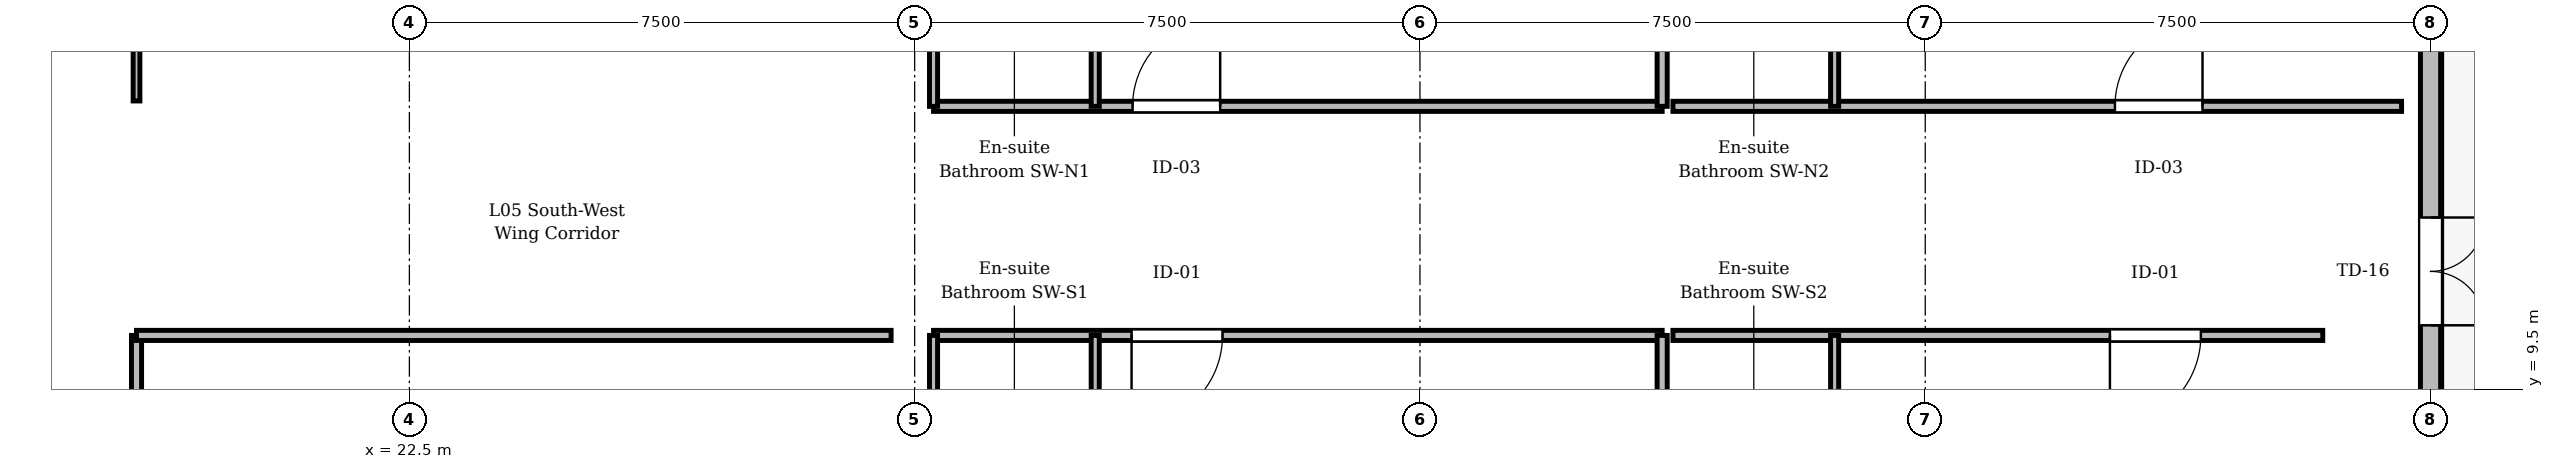
"""IFC4 building model, lengths in metres.
Left out: names, types, materials, properties, quantities, classifications, styles, units other than length and angle.
Written with IfcOpenShell. Run it as: python <this file> out.ifc"""

import sys

from ifc_helpers import new_model, si_unit, direction, frame, frame_2d, origin, place, context, subcontext, project, spatial, rectangle, extrude, element, fill, save


model = new_model("IFC4")
c1 = context("Model", 3, precision=1e-05, world=origin(), true_north=direction((0.0, 1.0)))
c2 = subcontext(c1, "Body", "Model", "MODEL_VIEW")
j1 = project(units=[si_unit("LENGTHUNIT", "METRE"), si_unit("PLANEANGLEUNIT", "RADIAN")], contexts=[c1])
p1 = place(None, origin())
s1 = spatial("IfcSite", under=j1, at=p1, CompositionType="ELEMENT")
p2 = place(p1, origin())
s2 = spatial("IfcBuilding", under=s1, at=p2, CompositionType="ELEMENT")
p3 = place(p2, frame((0.0, 0.0, 21.9)))
s3 = spatial("IfcBuildingStorey", under=s2, at=p3, CompositionType="ELEMENT", Elevation=21.9)
p4 = place(p3, frame((52.5, 14.765, 0.0), z_axis=(0.0, 0.0, 1.0), x_axis=(0.0, -1.0, 0.0)))
e1 = element("IfcWall", 1, at=p4, inside=s3, PredefinedType="STANDARD", context=c2, shape_type="SweptSolid", body=[
    extrude(rectangle(XDim=7.03, YDim=0.3, at=frame_2d((3.515, 0.0))), origin(), (0.0, 0.0, 1.0), 3.17),
])
p5 = place(p4, frame((2.715, 0.0, 0.0)))
e2 = element("IfcOpeningElement", 2, at=p5, cuts=e1, PredefinedType="OPENING", context=c2, shape_type="SweptSolid", body=[
    extrude(rectangle(XDim=1.6, YDim=2.35, at=frame_2d((0.8, 1.175))), frame((0.0, 0.16, 0.0), z_axis=(0.0, -1.0, 0.0), x_axis=(1.0, 0.0, 0.0)), (0.0, 0.0, 1.0), 0.32),
])
p6 = place(p3, frame((18.45, 10.3, 0.0), z_axis=(0.0, 0.0, 1.0), x_axis=(0.0, -1.0, 0.0)))
e3 = element("IfcWall", 3, at=p6, inside=s3, PredefinedType="PARTITIONING", context=c2, shape_type="SweptSolid", body=[
    extrude(rectangle(XDim=9.95, YDim=0.15, at=frame_2d((4.975, 0.0))), origin(), (0.0, 0.0, 1.0), 3.755),
])
p7 = place(p6, frame((5.92, 0.0, 0.0)))
e4 = element("IfcOpeningElement", 4, at=p7, cuts=e3, PredefinedType="OPENING", context=c2, shape_type="SweptSolid", body=[
    extrude(rectangle(XDim=1.35, YDim=2.25, at=frame_2d((0.675, 1.125))), frame((0.0, 0.085, 0.0), z_axis=(0.0, -1.0, 0.0), x_axis=(1.0, 0.0, 0.0)), (0.0, 0.0, 1.0), 0.17),
])
p8 = place(p3, frame((18.45, 23.114, 0.0), z_axis=(0.0, 0.0, 1.0), x_axis=(0.0, -1.0, 0.0)))
e5 = element("IfcWall", 5, at=p8, inside=s3, PredefinedType="PARTITIONING", context=c2, shape_type="SweptSolid", body=[
    extrude(rectangle(XDim=9.334, YDim=0.1, at=frame_2d((4.667, 0.0))), origin(), (0.0, 0.0, 1.0), 3.355),
])
p9 = place(p8, frame((4.092, 0.0, 0.0)))
e6 = element("IfcOpeningElement", 6, at=p9, cuts=e5, PredefinedType="OPENING", context=c2, shape_type="SweptSolid", body=[
    extrude(rectangle(XDim=1.15, YDim=2.2, at=frame_2d((0.575, 1.1))), frame((0.0, 0.06, 0.0), z_axis=(0.0, -1.0, 0.0), x_axis=(1.0, 0.0, 0.0)), (0.0, 0.0, 1.0), 0.12),
])
p10 = place(p3, frame((41.095, 10.3, 0.0), z_axis=(0.0, 0.0, 1.0), x_axis=(-1.0, 0.0, 0.0)))
e7 = element("IfcWall", 7, at=p10, inside=s3, PredefinedType="PARTITIONING", context=c2, shape_type="SweptSolid", body=[
    extrude(rectangle(XDim=10.815, YDim=0.15, at=frame_2d((5.407, 0.0))), origin(), (0.0, 0.0, 1.0), 3.755),
])
p11 = place(p10, frame((6.525, 0.0, 0.0)))
e8 = element("IfcOpeningElement", 8, at=p11, cuts=e7, PredefinedType="OPENING", context=c2, shape_type="SweptSolid", body=[
    extrude(rectangle(XDim=1.35, YDim=2.25, at=frame_2d((0.675, 1.125))), frame((0.0, 0.085, 0.0), z_axis=(0.0, -1.0, 0.0), x_axis=(1.0, 0.0, 0.0)), (0.0, 0.0, 1.0), 0.17),
])
p12 = place(p3, frame((32.68, 8.3, 0.0), z_axis=(0.0, 0.0, 1.0), x_axis=(0.0, 1.0, 0.0)))
e9 = element("IfcWall", 9, at=p12, inside=s3, PredefinedType="PARTITIONING", context=c2, shape_type="SweptSolid", body=[
    extrude(rectangle(XDim=2.0, YDim=0.12, at=frame_2d((1.0, 0.0))), origin(), (0.0, 0.0, 1.0), 3.755),
])
p13 = place(p3, frame((30.28, 13.7, 0.0), z_axis=(0.0, 0.0, 1.0), x_axis=(1.0, 0.0, 0.0)))
e10 = element("IfcWall", 10, at=p13, inside=s3, PredefinedType="PARTITIONING", context=c2, shape_type="SweptSolid", body=[
    extrude(rectangle(XDim=10.815, YDim=0.15, at=frame_2d((5.407, 0.0))), origin(), (0.0, 0.0, 1.0), 3.755),
])
p14 = place(p13, frame((2.955, 0.0, 0.0)))
e11 = element("IfcOpeningElement", 11, at=p14, cuts=e10, PredefinedType="OPENING", context=c2, shape_type="SweptSolid", body=[
    extrude(rectangle(XDim=1.3, YDim=2.2, at=frame_2d((0.65, 1.1))), frame((0.0, 0.085, 0.0), z_axis=(0.0, -1.0, 0.0), x_axis=(1.0, 0.0, 0.0)), (0.0, 0.0, 1.0), 0.17),
])
p15 = place(p3, frame((32.68, 13.7, 0.0), z_axis=(0.0, 0.0, 1.0), x_axis=(0.0, 1.0, 0.0)))
e12 = element("IfcWall", 12, at=p15, inside=s3, PredefinedType="PARTITIONING", context=c2, shape_type="SweptSolid", body=[
    extrude(rectangle(XDim=2.0, YDim=0.12, at=frame_2d((1.0, 0.0))), origin(), (0.0, 0.0, 1.0), 3.755),
])
p16 = place(p3, frame((50.9, 10.3, 0.0), z_axis=(0.0, 0.0, 1.0), x_axis=(-1.0, 0.0, 0.0)))
e13 = element("IfcWall", 13, at=p16, inside=s3, PredefinedType="PARTITIONING", context=c2, shape_type="SweptSolid", body=[
    extrude(rectangle(XDim=9.645, YDim=0.15, at=frame_2d((4.823, 0.0))), origin(), (0.0, 0.0, 1.0), 3.755),
])
p17 = place(p16, frame((1.809, 0.0, 0.0)))
e14 = element("IfcOpeningElement", 14, at=p17, cuts=e13, PredefinedType="OPENING", context=c2, shape_type="SweptSolid", body=[
    extrude(rectangle(XDim=1.35, YDim=2.25, at=frame_2d((0.675, 1.125))), frame((0.0, 0.085, 0.0), z_axis=(0.0, -1.0, 0.0), x_axis=(1.0, 0.0, 0.0)), (0.0, 0.0, 1.0), 0.17),
])
p18 = place(p3, frame((43.655, 8.3, 0.0), z_axis=(0.0, 0.0, 1.0), x_axis=(0.0, 1.0, 0.0)))
e15 = element("IfcWall", 15, at=p18, inside=s3, PredefinedType="PARTITIONING", context=c2, shape_type="SweptSolid", body=[
    extrude(rectangle(XDim=2.0, YDim=0.12, at=frame_2d((1.0, 0.0))), origin(), (0.0, 0.0, 1.0), 3.755),
])
p19 = place(p3, frame((41.255, 13.7, 0.0), z_axis=(0.0, 0.0, 1.0), x_axis=(1.0, 0.0, 0.0)))
e16 = element("IfcWall", 16, at=p19, inside=s3, PredefinedType="PARTITIONING", context=c2, shape_type="SweptSolid", body=[
    extrude(rectangle(XDim=10.815, YDim=0.15, at=frame_2d((5.408, 0.0))), origin(), (0.0, 0.0, 1.0), 3.755),
])
p20 = place(p19, frame((6.561, 0.0, 0.0)))
e17 = element("IfcOpeningElement", 17, at=p20, cuts=e16, PredefinedType="OPENING", context=c2, shape_type="SweptSolid", body=[
    extrude(rectangle(XDim=1.3, YDim=2.2, at=frame_2d((0.65, 1.1))), frame((0.0, 0.085, 0.0), z_axis=(0.0, -1.0, 0.0), x_axis=(1.0, 0.0, 0.0)), (0.0, 0.0, 1.0), 0.17),
])
p21 = place(p3, frame((43.655, 13.7, 0.0), z_axis=(0.0, 0.0, 1.0), x_axis=(0.0, 1.0, 0.0)))
e18 = element("IfcWall", 18, at=p21, inside=s3, PredefinedType="PARTITIONING", context=c2, shape_type="SweptSolid", body=[
    extrude(rectangle(XDim=2.0, YDim=0.12, at=frame_2d((1.0, 0.0))), origin(), (0.0, 0.0, 1.0), 3.755),
])
p22 = place(p3, frame((18.45, 10.3, 0.0), z_axis=(0.0, 0.0, 1.0), x_axis=(1.0, 0.0, 0.0)))
e19 = element("IfcWall", 19, at=p22, inside=s3, PredefinedType="PARTITIONING", context=c2, shape_type="SweptSolid", body=[
    extrude(rectangle(XDim=11.2, YDim=0.15, at=frame_2d((5.6, 0.0))), origin(), (0.0, 0.0, 1.0), 3.755),
])
p23 = place(p3, frame((41.095, 0.35, 0.0), z_axis=(0.0, 0.0, 1.0), x_axis=(0.0, 1.0, 0.0)))
e20 = element("IfcWall", 20, at=p23, inside=s3, PredefinedType="PARTITIONING", context=c2, shape_type="SweptSolid", body=[
    extrude(rectangle(XDim=9.95, YDim=0.15, at=frame_2d((4.975, 0.0))), origin(), (0.0, 0.0, 1.0), 3.755),
])
p24 = place(p3, frame((41.095, 13.7, 0.0), z_axis=(0.0, 0.0, 1.0), x_axis=(0.0, 1.0, 0.0)))
e21 = element("IfcWall", 21, at=p24, inside=s3, PredefinedType="PARTITIONING", context=c2, shape_type="SweptSolid", body=[
    extrude(rectangle(XDim=8.45, YDim=0.15, at=frame_2d((4.225, 0.0))), origin(), (0.0, 0.0, 1.0), 3.755),
])
p25 = place(p3, frame((30.28, 8.3, 0.0), z_axis=(0.0, 0.0, 1.0), x_axis=(0.0, 1.0, 0.0)))
e22 = element("IfcWall", 22, at=p25, inside=s3, PredefinedType="PARTITIONING", context=c2, shape_type="SweptSolid", body=[
    extrude(rectangle(XDim=2.0, YDim=0.12, at=frame_2d((1.0, 0.0))), origin(), (0.0, 0.0, 1.0), 3.255),
])
p26 = place(p3, frame((30.28, 13.7, 0.0), z_axis=(0.0, 0.0, 1.0), x_axis=(0.0, 1.0, 0.0)))
e23 = element("IfcWall", 23, at=p26, inside=s3, PredefinedType="PARTITIONING", context=c2, shape_type="SweptSolid", body=[
    extrude(rectangle(XDim=2.0, YDim=0.12, at=frame_2d((1.0, 0.0))), origin(), (0.0, 0.0, 1.0), 3.205),
])
p27 = place(p5, origin())
e24 = element("IfcDoor", 24, at=p27, inside=s3, OperationType="DOUBLE_DOOR_SINGLE_SWING", PredefinedType="DOOR", context=c2, shape_type="SweptSolid", body=[
    extrude(rectangle(XDim=1.6, YDim=2.35, at=frame_2d((0.8, 1.175))), frame((0.0, 0.025, 0.0), z_axis=(0.0, -1.0, 0.0), x_axis=(1.0, 0.0, 0.0)), (0.0, 0.0, 1.0), 0.05),
])
fill(e2, e24)
p28 = place(p11, origin())
e25 = element("IfcDoor", 25, at=p28, inside=s3, OperationType="SINGLE_SWING_RIGHT", PredefinedType="DOOR", context=c2, shape_type="SweptSolid", body=[
    extrude(rectangle(XDim=1.35, YDim=2.25, at=frame_2d((0.675, 1.125))), frame((0.0, 0.025, 0.0), z_axis=(0.0, -1.0, 0.0), x_axis=(1.0, 0.0, 0.0)), (0.0, 0.0, 1.0), 0.05),
])
fill(e8, e25)
p29 = place(p14, origin())
e26 = element("IfcDoor", 26, at=p29, inside=s3, OperationType="SINGLE_SWING_RIGHT", PredefinedType="DOOR", context=c2, shape_type="SweptSolid", body=[
    extrude(rectangle(XDim=1.3, YDim=2.2, at=frame_2d((0.65, 1.1))), frame((0.0, 0.025, 0.0), z_axis=(0.0, -1.0, 0.0), x_axis=(1.0, 0.0, 0.0)), (0.0, 0.0, 1.0), 0.05),
])
fill(e11, e26)
p30 = place(p17, origin())
e27 = element("IfcDoor", 27, at=p30, inside=s3, OperationType="SINGLE_SWING_RIGHT", PredefinedType="DOOR", context=c2, shape_type="SweptSolid", body=[
    extrude(rectangle(XDim=1.35, YDim=2.25, at=frame_2d((0.675, 1.125))), frame((0.0, 0.025, 0.0), z_axis=(0.0, -1.0, 0.0), x_axis=(1.0, 0.0, 0.0)), (0.0, 0.0, 1.0), 0.05),
])
fill(e14, e27)
p31 = place(p20, origin())
e28 = element("IfcDoor", 28, at=p31, inside=s3, OperationType="SINGLE_SWING_RIGHT", PredefinedType="DOOR", context=c2, shape_type="SweptSolid", body=[
    extrude(rectangle(XDim=1.3, YDim=2.2, at=frame_2d((0.65, 1.1))), frame((0.0, 0.025, 0.0), z_axis=(0.0, -1.0, 0.0), x_axis=(1.0, 0.0, 0.0)), (0.0, 0.0, 1.0), 0.05),
])
fill(e17, e28)
save(model, sys.argv[1])
